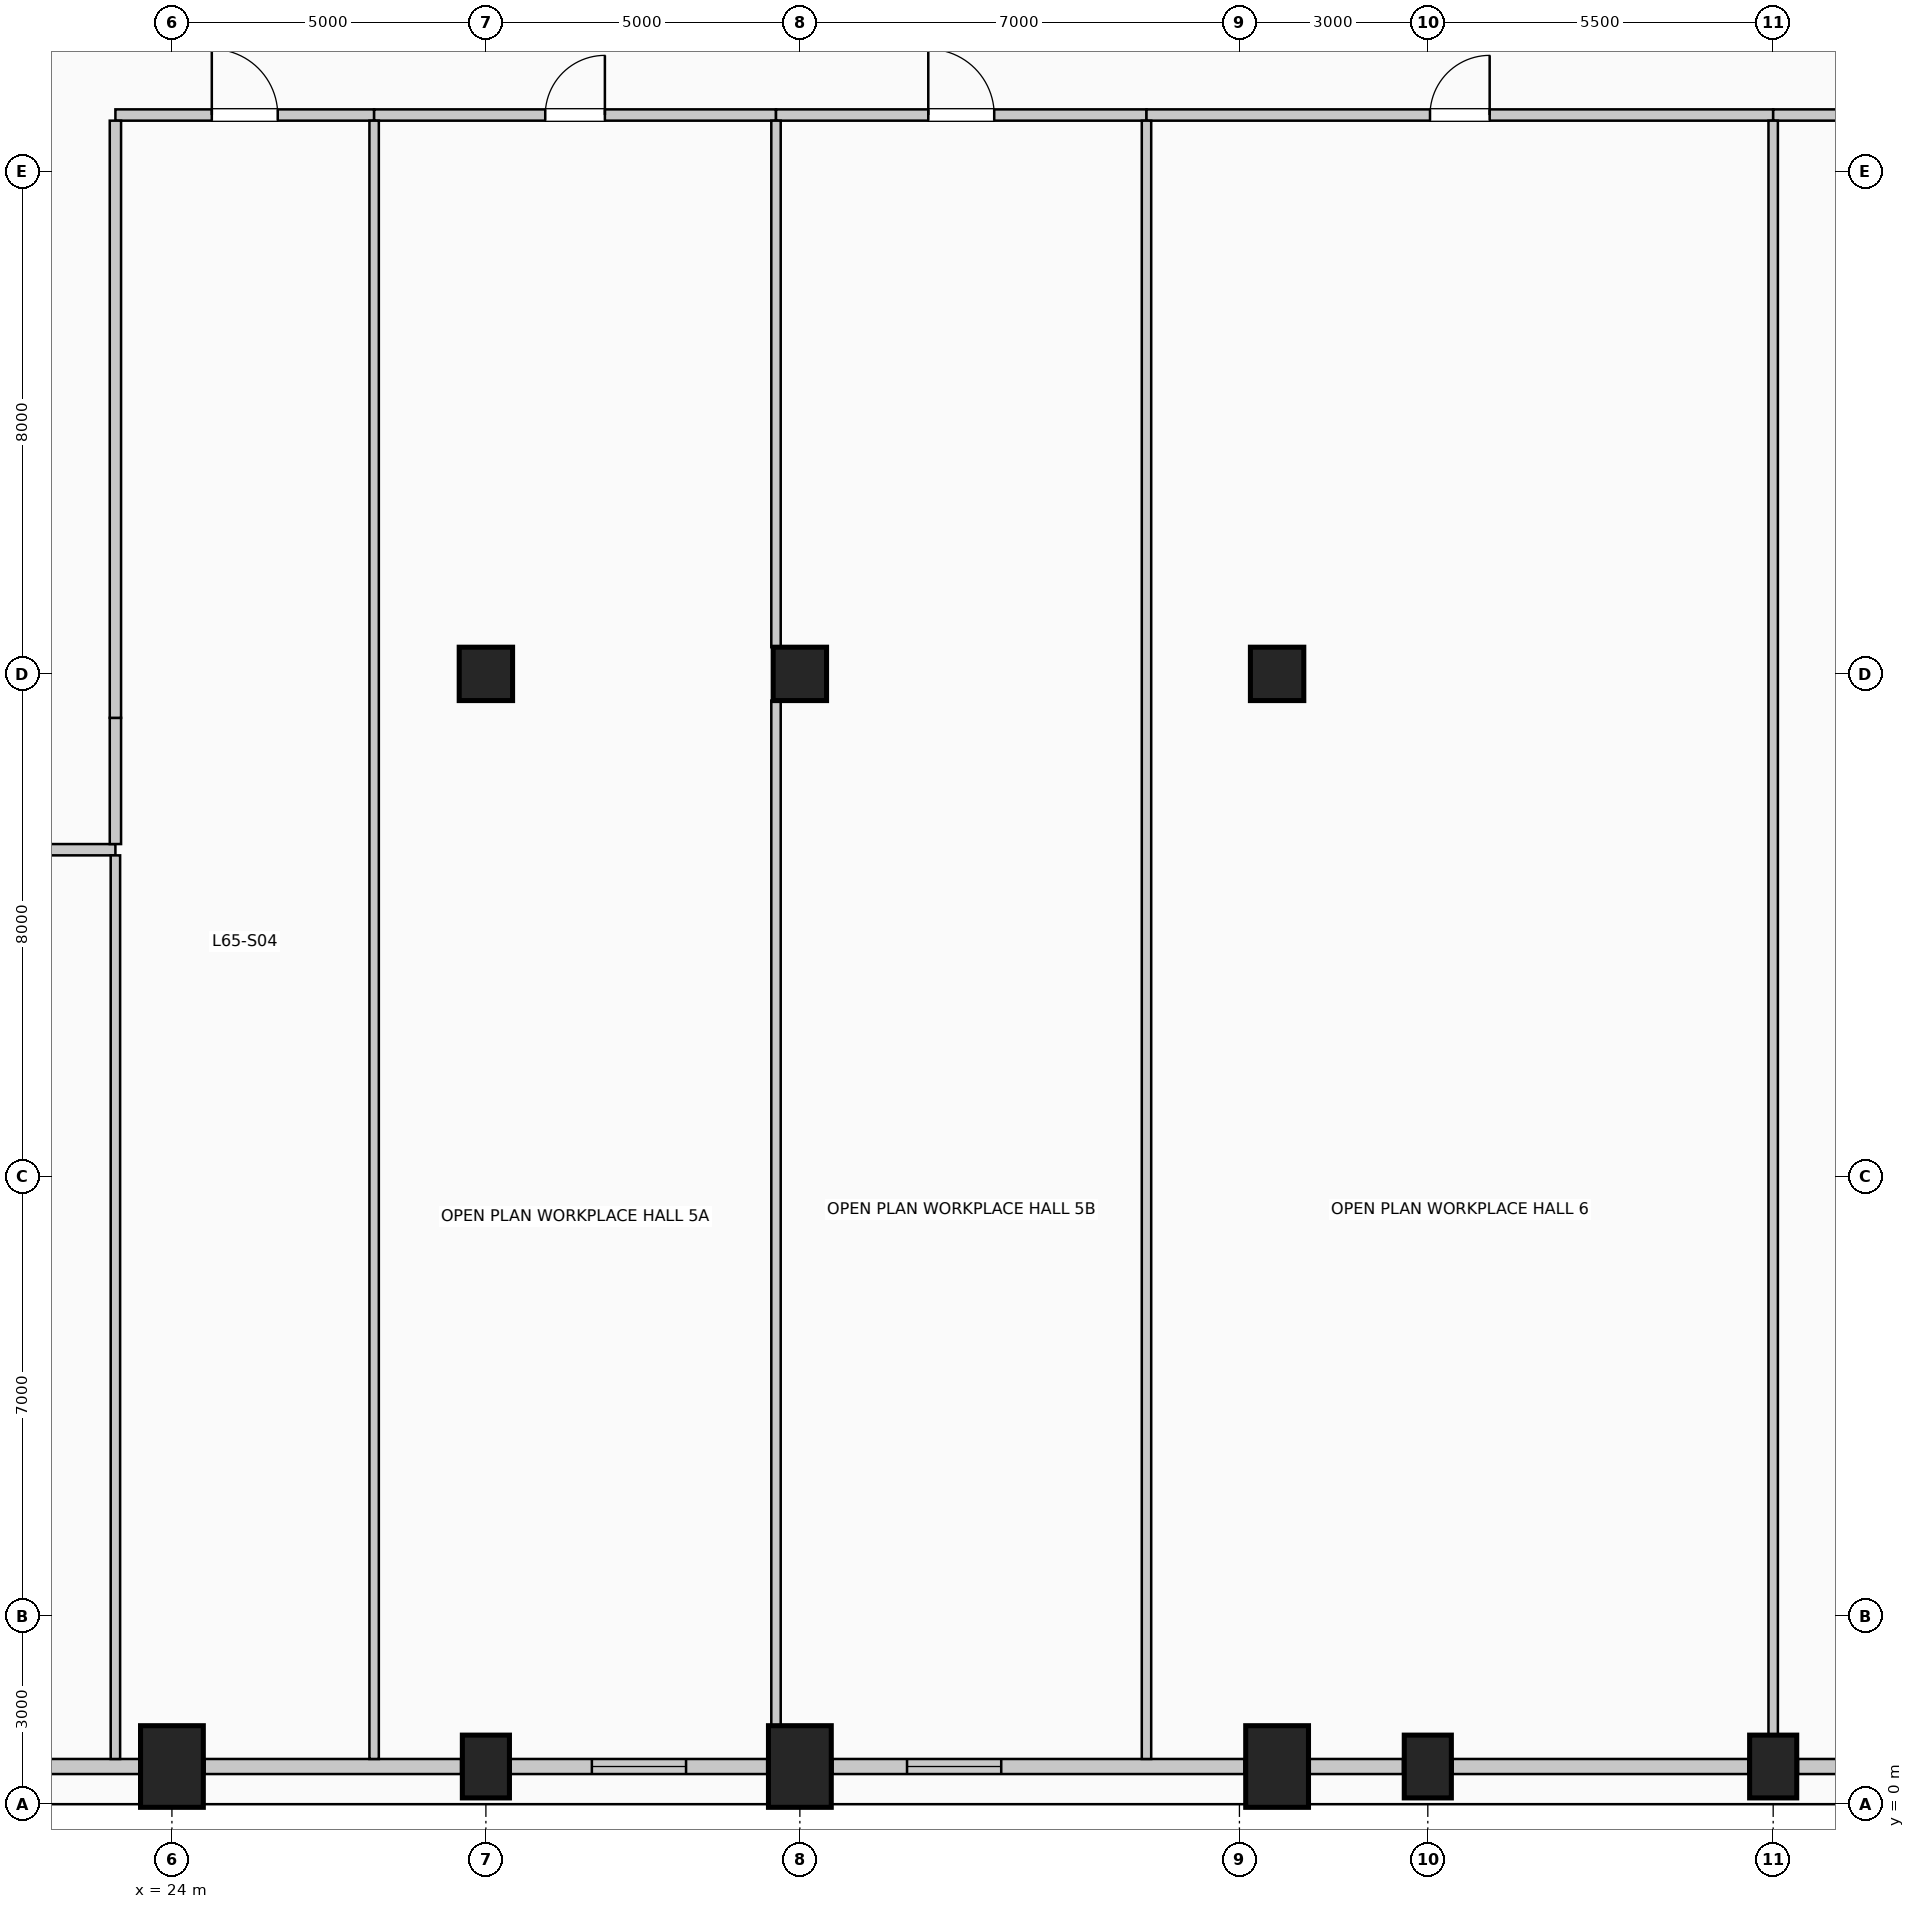
"""IFC4 building model, lengths in metres.
Left out: names, types, materials, properties, quantities, classifications, styles, units other than length and angle.
Written with IfcOpenShell. Run it as: python <this file> out.ifc"""

import sys

from ifc_helpers import new_model, si_unit, direction, frame, frame_2d, origin, origin_2d, place, context, subcontext, project, spatial, rectangle, circle, extrude, element, fill, save


model = new_model("IFC4")
c1 = context("Model", 3, precision=1e-05, world=origin(), true_north=direction((0.0, 1.0)))
c2 = subcontext(c1, "Body", "Model", "MODEL_VIEW")
j1 = project(units=[si_unit("LENGTHUNIT", "METRE"), si_unit("PLANEANGLEUNIT", "RADIAN")], contexts=[c1])
p1 = place(None, origin())
s1 = spatial("IfcSite", under=j1, at=p1, CompositionType="ELEMENT")
p2 = place(p1, origin())
s2 = spatial("IfcBuilding", under=s1, at=p2, CompositionType="ELEMENT")
p3 = place(p2, frame((0.0, 0.0, 268.6)))
s3 = spatial("IfcBuildingStorey", under=s2, at=p3, CompositionType="ELEMENT", Elevation=268.6)
p4 = place(p3, frame((24.0, 0.6, 0.0), z_axis=(0.0, 0.0, 1.0), x_axis=(1.0, 0.0, 0.0)))
e1 = element("IfcColumn", 1, at=p4, inside=s3, PredefinedType="COLUMN", context=c2, shape_type="SweptSolid", body=[
    extrude(rectangle(XDim=1.0, YDim=1.3, at=origin_2d()), origin(), (0.0, 0.0, 1.0), 4.0),
])
p5 = place(p3, frame((29.0, 0.6, 0.0), z_axis=(0.0, 0.0, 1.0), x_axis=(1.0, 0.0, 0.0)))
e2 = element("IfcColumn", 2, at=p5, inside=s3, PredefinedType="COLUMN", context=c2, shape_type="SweptSolid", body=[
    extrude(rectangle(XDim=0.75, YDim=1.0, at=origin_2d()), origin(), (0.0, 0.0, 1.0), 4.0),
])
for number, where, z_axis, x_axis in (
    (3, (34.0, 0.6, 0.0), (0.0, 0.0, 1.0), (1.0, 0.0, 0.0)),
    (4, (41.6, 0.6, 0.0), (0.0, 0.0, 1.0), (1.0, 0.0, 0.0)),
):
    element("IfcColumn", number, at=place(p3, frame(where, z_axis=z_axis, x_axis=x_axis)), inside=s3, PredefinedType="COLUMN", context=c2, shape_type="SweptSolid", body=[
        extrude(rectangle(XDim=1.0, YDim=1.3, at=origin_2d()), origin(), (0.0, 0.0, 1.0), 4.0),
    ])
for number, where, z_axis, x_axis in (
    (5, (44.0, 0.6, 0.0), (0.0, 0.0, 1.0), (1.0, 0.0, 0.0)),
    (6, (49.5, 0.6, 0.0), (0.0, 0.0, 1.0), (1.0, 0.0, 0.0)),
):
    element("IfcColumn", number, at=place(p3, frame(where, z_axis=z_axis, x_axis=x_axis)), inside=s3, PredefinedType="COLUMN", context=c2, shape_type="SweptSolid", body=[
        extrude(rectangle(XDim=0.75, YDim=1.0, at=origin_2d()), origin(), (0.0, 0.0, 1.0), 4.0),
    ])
for number, where, z_axis, x_axis in (
    (7, (29.0, 18.0, 0.0), (0.0, 0.0, 1.0), (1.0, 0.0, 0.0)),
    (8, (41.6, 18.0, 0.0), (0.0, 0.0, 1.0), (1.0, 0.0, 0.0)),
    (9, (34.0, 18.0, 0.0), (0.0, 0.0, 1.0), (1.0, 0.0, 0.0)),
):
    element("IfcColumn", number, at=place(p3, frame(where, z_axis=z_axis, x_axis=x_axis)), inside=s3, PredefinedType="COLUMN", context=c2, shape_type="SweptSolid", body=[
        extrude(circle(Radius=0.425, at=origin_2d()), origin(), (0.0, 0.0, 1.0), 4.0),
    ])
p6 = place(p3, frame((23.48, 0.6, 0.0), z_axis=(0.0, 0.0, 1.0), x_axis=(-1.0, 0.0, 0.0)))
e10 = element("IfcWall", 10, at=p6, inside=s3, PredefinedType="SOLIDWALL", context=c2, shape_type="SweptSolid", body=[
    extrude(rectangle(XDim=6.56, YDim=0.24, at=frame_2d((3.28, 0.0))), origin(), (0.0, 0.0, 1.0), 3.0),
])
p7 = place(p6, frame((3.873, 0.0, 0.42)))
e11 = element("IfcOpeningElement", 11, at=p7, cuts=e10, PredefinedType="OPENING", context=c2, shape_type="SweptSolid", body=[
    extrude(rectangle(XDim=1.5, YDim=2.2, at=frame_2d((0.75, 1.1))), frame((0.0, 0.13, 0.0), z_axis=(0.0, -1.0, 0.0), x_axis=(1.0, 0.0, 0.0)), (0.0, 0.0, 1.0), 0.26),
])
p8 = place(p3, frame((28.605, 0.6, 0.0), z_axis=(0.0, 0.0, 1.0), x_axis=(-1.0, 0.0, 0.0)))
e12 = element("IfcWall", 12, at=p8, inside=s3, PredefinedType="SOLIDWALL", context=c2, shape_type="SweptSolid", body=[
    extrude(rectangle(XDim=4.085, YDim=0.24, at=frame_2d((2.042, 0.0))), origin(), (0.0, 0.0, 1.0), 3.0),
])
p9 = place(p3, frame((33.48, 0.6, 0.0), z_axis=(0.0, 0.0, 1.0), x_axis=(-1.0, 0.0, 0.0)))
e13 = element("IfcWall", 13, at=p9, inside=s3, PredefinedType="SOLIDWALL", context=c2, shape_type="SweptSolid", body=[
    extrude(rectangle(XDim=4.085, YDim=0.24, at=frame_2d((2.042, 0.0))), origin(), (0.0, 0.0, 1.0), 3.0),
])
p10 = place(p9, frame((1.292, 0.0, 0.42)))
e14 = element("IfcOpeningElement", 14, at=p10, cuts=e13, PredefinedType="OPENING", context=c2, shape_type="SweptSolid", body=[
    extrude(rectangle(XDim=1.5, YDim=2.2, at=frame_2d((0.75, 1.1))), frame((0.0, 0.13, 0.0), z_axis=(0.0, -1.0, 0.0), x_axis=(1.0, 0.0, 0.0)), (0.0, 0.0, 1.0), 0.26),
])
p11 = place(p3, frame((41.08, 0.6, 0.0), z_axis=(0.0, 0.0, 1.0), x_axis=(-1.0, 0.0, 0.0)))
e15 = element("IfcWall", 15, at=p11, inside=s3, PredefinedType="SOLIDWALL", context=c2, shape_type="SweptSolid", body=[
    extrude(rectangle(XDim=6.56, YDim=0.24, at=frame_2d((3.28, 0.0))), origin(), (0.0, 0.0, 1.0), 3.0),
])
p12 = place(p11, frame((3.873, 0.0, 0.42)))
e16 = element("IfcOpeningElement", 16, at=p12, cuts=e15, PredefinedType="OPENING", context=c2, shape_type="SweptSolid", body=[
    extrude(rectangle(XDim=1.5, YDim=2.2, at=frame_2d((0.75, 1.1))), frame((0.0, 0.13, 0.0), z_axis=(0.0, -1.0, 0.0), x_axis=(1.0, 0.0, 0.0)), (0.0, 0.0, 1.0), 0.26),
])
p13 = place(p3, frame((43.605, 0.6, 0.0), z_axis=(0.0, 0.0, 1.0), x_axis=(-1.0, 0.0, 0.0)))
e17 = element("IfcWall", 17, at=p13, inside=s3, PredefinedType="SOLIDWALL", context=c2, shape_type="SweptSolid", body=[
    extrude(rectangle(XDim=1.485, YDim=0.24, at=frame_2d((0.742, 0.0))), origin(), (0.0, 0.0, 1.0), 3.0),
])
p14 = place(p3, frame((49.105, 0.6, 0.0), z_axis=(0.0, 0.0, 1.0), x_axis=(-1.0, 0.0, 0.0)))
e18 = element("IfcWall", 18, at=p14, inside=s3, PredefinedType="SOLIDWALL", context=c2, shape_type="SweptSolid", body=[
    extrude(rectangle(XDim=4.71, YDim=0.24, at=frame_2d((2.355, 0.0))), origin(), (0.0, 0.0, 1.0), 3.0),
])
p15 = place(p3, frame((54.005, 0.6, 0.0), z_axis=(0.0, 0.0, 1.0), x_axis=(-1.0, 0.0, 0.0)))
e19 = element("IfcWall", 19, at=p15, inside=s3, PredefinedType="SOLIDWALL", context=c2, shape_type="SweptSolid", body=[
    extrude(rectangle(XDim=4.11, YDim=0.24, at=frame_2d((2.055, 0.0))), origin(), (0.0, 0.0, 1.0), 3.0),
])
p16 = place(p15, frame((1.305, 0.0, 0.42)))
e20 = element("IfcOpeningElement", 20, at=p16, cuts=e19, PredefinedType="OPENING", context=c2, shape_type="SweptSolid", body=[
    extrude(rectangle(XDim=1.5, YDim=2.2, at=frame_2d((0.75, 1.1))), frame((0.0, 0.13, 0.0), z_axis=(0.0, -1.0, 0.0), x_axis=(1.0, 0.0, 0.0)), (0.0, 0.0, 1.0), 0.26),
])
p17 = place(p3, frame((16.4, 15.2, 0.0), z_axis=(0.0, 0.0, 1.0), x_axis=(1.0, 0.0, 0.0)))
e21 = element("IfcWall", 21, at=p17, inside=s3, PredefinedType="PARTITIONING", context=c2, shape_type="SweptSolid", body=[
    extrude(rectangle(XDim=6.7, YDim=0.18, at=frame_2d((3.35, 0.0))), origin(), (0.0, 0.0, 1.0), 3.75),
])
p18 = place(p17, frame((2.875, 0.0, 0.0)))
e22 = element("IfcOpeningElement", 22, at=p18, cuts=e21, PredefinedType="OPENING", context=c2, shape_type="SweptSolid", body=[
    extrude(rectangle(XDim=0.95, YDim=2.15, at=frame_2d((0.475, 1.075))), frame((0.0, 0.1, 0.0), z_axis=(0.0, -1.0, 0.0), x_axis=(1.0, 0.0, 0.0)), (0.0, 0.0, 1.0), 0.2),
])
p19 = place(p3, frame((23.1, 26.9, 0.0), z_axis=(0.0, 0.0, 1.0), x_axis=(1.0, 0.0, 0.0)))
e23 = element("IfcWall", 23, at=p19, inside=s3, PredefinedType="PARTITIONING", context=c2, shape_type="SweptSolid", body=[
    extrude(rectangle(XDim=4.12, YDim=0.18, at=frame_2d((2.06, 0.0))), origin(), (0.0, 0.0, 1.0), 3.75),
])
p20 = place(p19, frame((1.535, 0.0, 0.0)))
e24 = element("IfcOpeningElement", 24, at=p20, cuts=e23, PredefinedType="OPENING", context=c2, shape_type="SweptSolid", body=[
    extrude(rectangle(XDim=1.05, YDim=2.15, at=frame_2d((0.525, 1.075))), frame((0.0, 0.1, 0.0), z_axis=(0.0, -1.0, 0.0), x_axis=(1.0, 0.0, 0.0)), (0.0, 0.0, 1.0), 0.2),
])
p21 = place(p3, frame((27.22, 26.9, 0.0), z_axis=(0.0, 0.0, 1.0), x_axis=(1.0, 0.0, 0.0)))
e25 = element("IfcWall", 25, at=p21, inside=s3, PredefinedType="PARTITIONING", context=c2, shape_type="SweptSolid", body=[
    extrude(rectangle(XDim=6.4, YDim=0.18, at=frame_2d((3.2, 0.0))), origin(), (0.0, 0.0, 1.0), 3.75),
])
p22 = place(p21, frame((2.725, 0.0, 0.0)))
e26 = element("IfcOpeningElement", 26, at=p22, cuts=e25, PredefinedType="OPENING", context=c2, shape_type="SweptSolid", body=[
    extrude(rectangle(XDim=0.95, YDim=2.15, at=frame_2d((0.475, 1.075))), frame((0.0, 0.1, 0.0), z_axis=(0.0, -1.0, 0.0), x_axis=(1.0, 0.0, 0.0)), (0.0, 0.0, 1.0), 0.2),
])
p23 = place(p3, frame((33.62, 26.9, 0.0), z_axis=(0.0, 0.0, 1.0), x_axis=(1.0, 0.0, 0.0)))
e27 = element("IfcWall", 27, at=p23, inside=s3, PredefinedType="PARTITIONING", context=c2, shape_type="SweptSolid", body=[
    extrude(rectangle(XDim=5.9, YDim=0.18, at=frame_2d((2.95, 0.0))), origin(), (0.0, 0.0, 1.0), 3.75),
])
p24 = place(p23, frame((2.425, 0.0, 0.0)))
e28 = element("IfcOpeningElement", 28, at=p24, cuts=e27, PredefinedType="OPENING", context=c2, shape_type="SweptSolid", body=[
    extrude(rectangle(XDim=1.05, YDim=2.15, at=frame_2d((0.525, 1.075))), frame((0.0, 0.1, 0.0), z_axis=(0.0, -1.0, 0.0), x_axis=(1.0, 0.0, 0.0)), (0.0, 0.0, 1.0), 0.2),
])
p25 = place(p3, frame((39.52, 26.9, 0.0), z_axis=(0.0, 0.0, 1.0), x_axis=(1.0, 0.0, 0.0)))
e29 = element("IfcWall", 29, at=p25, inside=s3, PredefinedType="PARTITIONING", context=c2, shape_type="SweptSolid", body=[
    extrude(rectangle(XDim=9.98, YDim=0.18, at=frame_2d((4.99, 0.0))), origin(), (0.0, 0.0, 1.0), 3.75),
])
p26 = place(p25, frame((4.515, 0.0, 0.0)))
e30 = element("IfcOpeningElement", 30, at=p26, cuts=e29, PredefinedType="OPENING", context=c2, shape_type="SweptSolid", body=[
    extrude(rectangle(XDim=0.95, YDim=2.15, at=frame_2d((0.475, 1.075))), frame((0.0, 0.1, 0.0), z_axis=(0.0, -1.0, 0.0), x_axis=(1.0, 0.0, 0.0)), (0.0, 0.0, 1.0), 0.2),
])
p27 = place(p3, frame((49.5, 26.9, 0.0), z_axis=(0.0, 0.0, 1.0), x_axis=(1.0, 0.0, 0.0)))
e31 = element("IfcWall", 31, at=p27, inside=s3, PredefinedType="PARTITIONING", context=c2, shape_type="SweptSolid", body=[
    extrude(rectangle(XDim=7.78, YDim=0.18, at=frame_2d((3.89, 0.0))), origin(), (0.0, 0.0, 1.0), 3.75),
])
p28 = place(p27, frame((3.365, 0.0, 0.0)))
e32 = element("IfcOpeningElement", 32, at=p28, cuts=e31, PredefinedType="OPENING", context=c2, shape_type="SweptSolid", body=[
    extrude(rectangle(XDim=1.05, YDim=2.15, at=frame_2d((0.525, 1.075))), frame((0.0, 0.1, 0.0), z_axis=(0.0, -1.0, 0.0), x_axis=(1.0, 0.0, 0.0)), (0.0, 0.0, 1.0), 0.2),
])
p29 = place(p3, frame((23.1, 0.72, 0.0), z_axis=(0.0, 0.0, 1.0), x_axis=(0.0, 1.0, 0.0)))
e33 = element("IfcWall", 33, at=p29, inside=s3, PredefinedType="PARTITIONING", context=c2, shape_type="SweptSolid", body=[
    extrude(rectangle(XDim=14.39, YDim=0.15, at=frame_2d((7.195, 0.0))), origin(), (0.0, 0.0, 1.0), 3.75),
])
p30 = place(p3, frame((23.1, 15.29, 0.0), z_axis=(0.0, 0.0, 1.0), x_axis=(0.0, 1.0, 0.0)))
e34 = element("IfcWall", 34, at=p30, inside=s3, PredefinedType="PARTITIONING", context=c2, shape_type="SweptSolid", body=[
    extrude(rectangle(XDim=2.01, YDim=0.18, at=frame_2d((1.005, 0.0))), origin(), (0.0, 0.0, 1.0), 3.75),
])
p31 = place(p3, frame((23.1, 17.3, 0.0), z_axis=(0.0, 0.0, 1.0), x_axis=(0.0, 1.0, 0.0)))
e35 = element("IfcWall", 35, at=p31, inside=s3, PredefinedType="PARTITIONING", context=c2, shape_type="SweptSolid", body=[
    extrude(rectangle(XDim=9.51, YDim=0.18, at=frame_2d((4.755, 0.0))), origin(), (0.0, 0.0, 1.0), 3.75),
])
p32 = place(p3, frame((27.22, 0.72, 0.0), z_axis=(0.0, 0.0, 1.0), x_axis=(0.0, 1.0, 0.0)))
e36 = element("IfcWall", 36, at=p32, inside=s3, PredefinedType="PARTITIONING", context=c2, shape_type="SweptSolid", body=[
    extrude(rectangle(XDim=26.09, YDim=0.15, at=frame_2d((13.045, 0.0))), origin(), (0.0, 0.0, 1.0), 3.75),
])
p33 = place(p3, frame((33.62, 1.25, 0.0), z_axis=(0.0, 0.0, 1.0), x_axis=(0.0, 1.0, 0.0)))
e37 = element("IfcWall", 37, at=p33, inside=s3, PredefinedType="PARTITIONING", context=c2, shape_type="SweptSolid", body=[
    extrude(rectangle(XDim=16.325, YDim=0.15, at=frame_2d((8.163, 0.0))), origin(), (0.0, 0.0, 1.0), 3.75),
])
p34 = place(p3, frame((33.62, 18.425, 0.0), z_axis=(0.0, 0.0, 1.0), x_axis=(0.0, 1.0, 0.0)))
e38 = element("IfcWall", 38, at=p34, inside=s3, PredefinedType="PARTITIONING", context=c2, shape_type="SweptSolid", body=[
    extrude(rectangle(XDim=8.385, YDim=0.15, at=frame_2d((4.192, 0.0))), origin(), (0.0, 0.0, 1.0), 3.75),
])
p35 = place(p3, frame((39.52, 0.72, 0.0), z_axis=(0.0, 0.0, 1.0), x_axis=(0.0, 1.0, 0.0)))
e39 = element("IfcWall", 39, at=p35, inside=s3, PredefinedType="PARTITIONING", context=c2, shape_type="SweptSolid", body=[
    extrude(rectangle(XDim=26.09, YDim=0.15, at=frame_2d((13.045, 0.0))), origin(), (0.0, 0.0, 1.0), 3.75),
])
p36 = place(p3, frame((49.5, 1.1, 0.0), z_axis=(0.0, 0.0, 1.0), x_axis=(0.0, 1.0, 0.0)))
e40 = element("IfcWall", 40, at=p36, inside=s3, PredefinedType="PARTITIONING", context=c2, shape_type="SweptSolid", body=[
    extrude(rectangle(XDim=25.71, YDim=0.15, at=frame_2d((12.855, 0.0))), origin(), (0.0, 0.0, 1.0), 3.75),
])
p37 = place(p10, origin())
e41 = element("IfcWindow", 41, at=p37, inside=s3, PartitioningType="SINGLE_PANEL", PredefinedType="WINDOW", context=c2, shape_type="SweptSolid", body=[
    extrude(rectangle(XDim=1.5, YDim=2.2, at=frame_2d((0.75, 1.1))), frame((0.0, 0.03, 0.0), z_axis=(0.0, -1.0, 0.0), x_axis=(1.0, 0.0, 0.0)), (0.0, 0.0, 1.0), 0.06),
])
fill(e14, e41)
p38 = place(p12, origin())
e42 = element("IfcWindow", 42, at=p38, inside=s3, PartitioningType="SINGLE_PANEL", PredefinedType="WINDOW", context=c2, shape_type="SweptSolid", body=[
    extrude(rectangle(XDim=1.5, YDim=2.2, at=frame_2d((0.75, 1.1))), frame((0.0, 0.03, 0.0), z_axis=(0.0, -1.0, 0.0), x_axis=(1.0, 0.0, 0.0)), (0.0, 0.0, 1.0), 0.06),
])
fill(e16, e42)
p39 = place(p20, origin())
e43 = element("IfcDoor", 43, at=p39, inside=s3, OperationType="SINGLE_SWING_LEFT", PredefinedType="DOOR", context=c2, shape_type="SweptSolid", body=[
    extrude(rectangle(XDim=1.05, YDim=2.15, at=frame_2d((0.525, 1.075))), frame((0.0, 0.025, 0.0), z_axis=(0.0, -1.0, 0.0), x_axis=(1.0, 0.0, 0.0)), (0.0, 0.0, 1.0), 0.05),
])
fill(e24, e43)
p40 = place(p22, origin())
e44 = element("IfcDoor", 44, at=p40, inside=s3, OperationType="SINGLE_SWING_RIGHT", PredefinedType="DOOR", context=c2, shape_type="SweptSolid", body=[
    extrude(rectangle(XDim=0.95, YDim=2.15, at=frame_2d((0.475, 1.075))), frame((0.0, 0.025, 0.0), z_axis=(0.0, -1.0, 0.0), x_axis=(1.0, 0.0, 0.0)), (0.0, 0.0, 1.0), 0.05),
])
fill(e26, e44)
p41 = place(p24, origin())
e45 = element("IfcDoor", 45, at=p41, inside=s3, OperationType="SINGLE_SWING_LEFT", PredefinedType="DOOR", context=c2, shape_type="SweptSolid", body=[
    extrude(rectangle(XDim=1.05, YDim=2.15, at=frame_2d((0.525, 1.075))), frame((0.0, 0.025, 0.0), z_axis=(0.0, -1.0, 0.0), x_axis=(1.0, 0.0, 0.0)), (0.0, 0.0, 1.0), 0.05),
])
fill(e28, e45)
p42 = place(p26, origin())
e46 = element("IfcDoor", 46, at=p42, inside=s3, OperationType="SINGLE_SWING_RIGHT", PredefinedType="DOOR", context=c2, shape_type="SweptSolid", body=[
    extrude(rectangle(XDim=0.95, YDim=2.15, at=frame_2d((0.475, 1.075))), frame((0.0, 0.025, 0.0), z_axis=(0.0, -1.0, 0.0), x_axis=(1.0, 0.0, 0.0)), (0.0, 0.0, 1.0), 0.05),
])
fill(e30, e46)
save(model, sys.argv[1])
